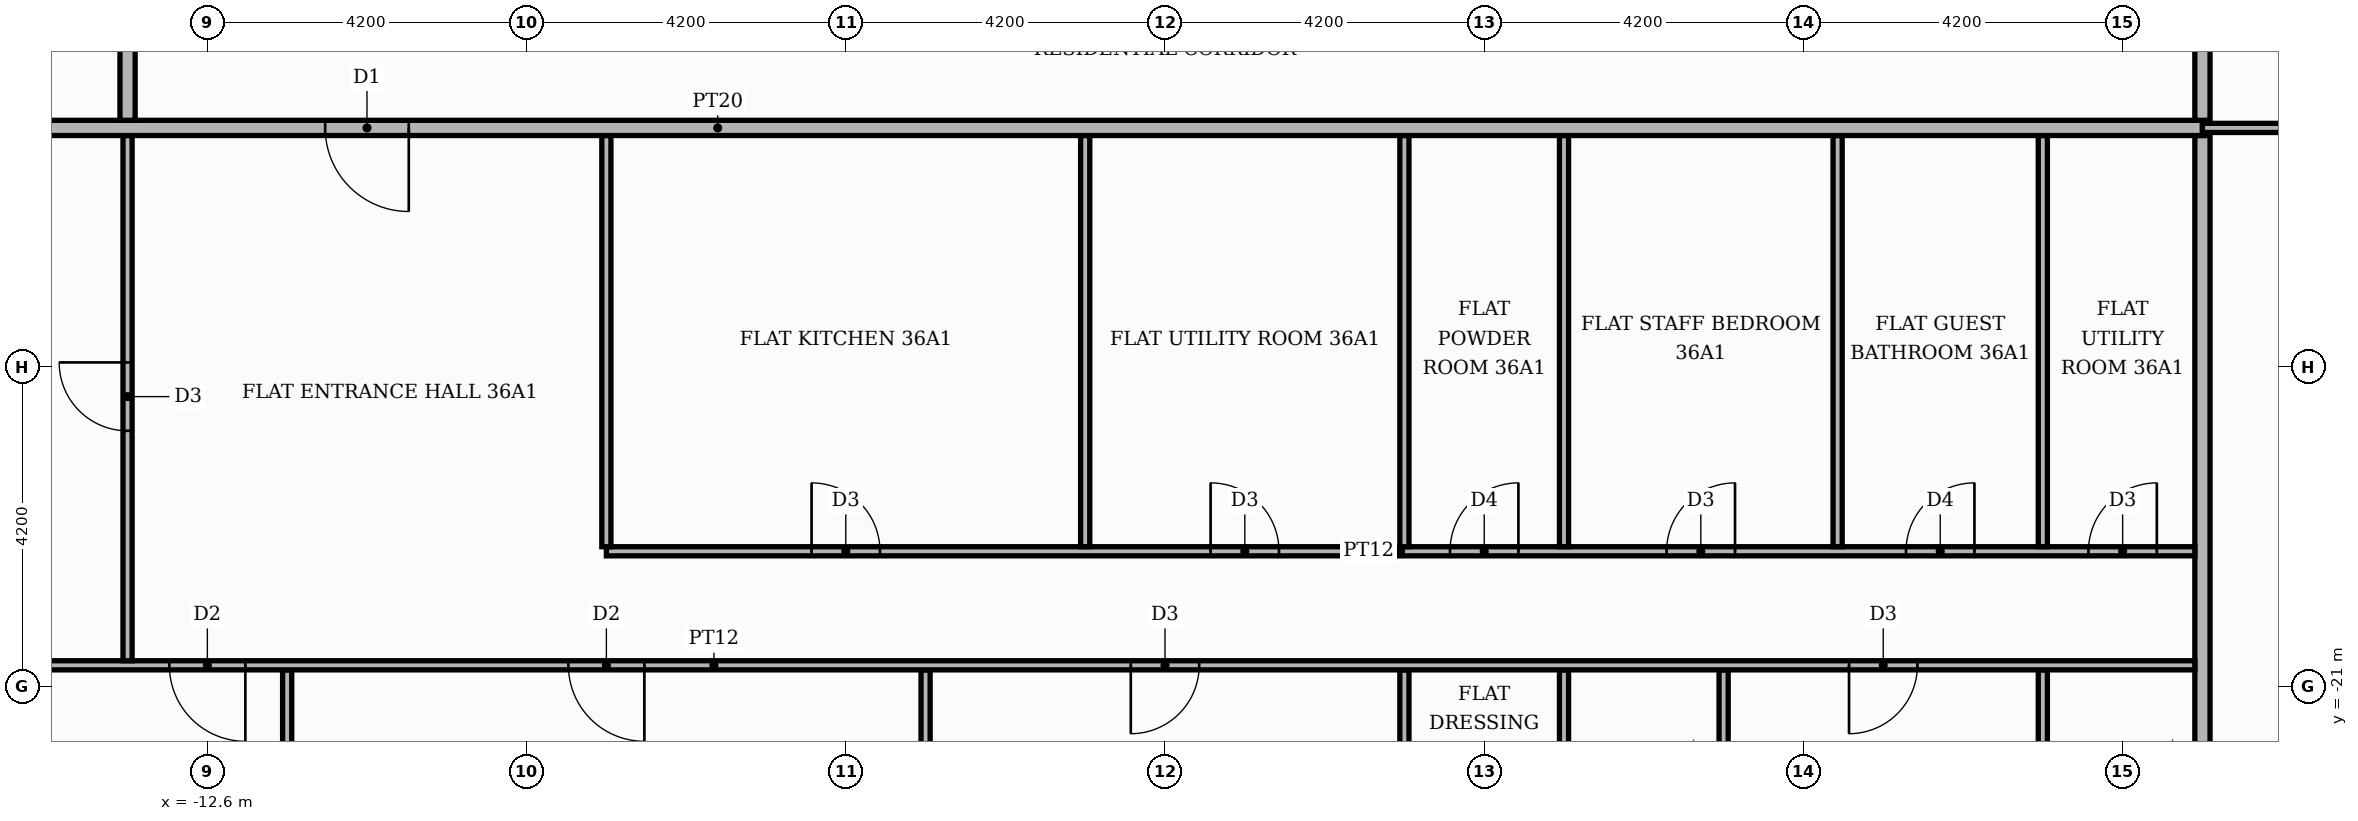
"""IFC4 building model, lengths in metres.
Left out: names, types, materials, properties, quantities, classifications, styles, units other than length and angle.
Written with IfcOpenShell. Run it as: python <this file> out.ifc"""

import sys

from ifc_helpers import new_model, si_unit, direction, frame, frame_2d, origin, place, context, subcontext, project, spatial, rectangle, extrude, element, fill, save


model = new_model("IFC4")
c1 = context("Model", 3, precision=1e-05, world=origin(), true_north=direction((0.0, 1.0)))
c2 = subcontext(c1, "Body", "Model", "MODEL_VIEW")
j1 = project(units=[si_unit("LENGTHUNIT", "METRE"), si_unit("PLANEANGLEUNIT", "RADIAN")], contexts=[c1])
p1 = place(None, origin())
s1 = spatial("IfcSite", under=j1, at=p1, CompositionType="ELEMENT")
p2 = place(p1, origin())
s2 = spatial("IfcBuilding", under=s1, at=p2, CompositionType="ELEMENT")
p3 = place(p2, frame((0.0, 0.0, 153.3)))
s3 = spatial("IfcBuildingStorey", under=s2, at=p3, CompositionType="ELEMENT", Elevation=153.3)
for number, where, z_axis, x_axis in (
    (1, (-11.55, -25.42, 0.0), (0.0, 0.0, 1.0), (0.0, 1.0, 0.0)),
    (2, (-3.15, -25.42, 0.0), (0.0, 0.0, 1.0), (0.0, 1.0, 0.0)),
):
    element("IfcWall", number, at=place(p3, frame(where, z_axis=z_axis, x_axis=x_axis)), inside=s3, PredefinedType="PARTITIONING", context=c2, shape_type="SweptSolid", body=[
        extrude(rectangle(XDim=4.64, YDim=0.12, at=frame_2d((2.32, 0.0))), origin(), (0.0, 0.0, 1.0), 3.48),
    ])
p4 = place(p3, frame((3.15, -25.42, 0.0), z_axis=(0.0, 0.0, 1.0), x_axis=(0.0, 1.0, 0.0)))
e3 = element("IfcWall", 3, at=p4, inside=s3, PredefinedType="PARTITIONING", context=c2, shape_type="SweptSolid", body=[
    extrude(rectangle(XDim=4.64, YDim=0.12, at=frame_2d((2.32, 0.0))), origin(), (0.0, 0.0, 1.0), 3.48),
])
p5 = place(p4, frame((1.75, 0.0, 0.0)))
e4 = element("IfcOpeningElement", 4, at=p5, cuts=e3, PredefinedType="OPENING", context=c2, shape_type="SweptSolid", body=[
    extrude(rectangle(XDim=0.9, YDim=2.1, at=frame_2d((0.45, 1.05))), frame((0.0, 0.07, 0.0), z_axis=(0.0, -1.0, 0.0), x_axis=(1.0, 0.0, 0.0)), (0.0, 0.0, 1.0), 0.14),
])
p6 = place(p3, frame((5.25, -25.42, 0.0), z_axis=(0.0, 0.0, 1.0), x_axis=(0.0, 1.0, 0.0)))
e5 = element("IfcWall", 5, at=p6, inside=s3, PredefinedType="PARTITIONING", context=c2, shape_type="SweptSolid", body=[
    extrude(rectangle(XDim=4.64, YDim=0.12, at=frame_2d((2.32, 0.0))), origin(), (0.0, 0.0, 1.0), 3.48),
])
p7 = place(p6, frame((1.75, 0.0, 0.0)))
e6 = element("IfcOpeningElement", 6, at=p7, cuts=e5, PredefinedType="OPENING", context=c2, shape_type="SweptSolid", body=[
    extrude(rectangle(XDim=0.9, YDim=2.1, at=frame_2d((0.45, 1.05))), frame((0.0, 0.07, 0.0), z_axis=(0.0, -1.0, 0.0), x_axis=(1.0, 0.0, 0.0)), (0.0, 0.0, 1.0), 0.14),
])
p8 = place(p3, frame((7.35, -25.42, 0.0), z_axis=(0.0, 0.0, 1.0), x_axis=(0.0, 1.0, 0.0)))
e7 = element("IfcWall", 7, at=p8, inside=s3, PredefinedType="PARTITIONING", context=c2, shape_type="SweptSolid", body=[
    extrude(rectangle(XDim=4.64, YDim=0.12, at=frame_2d((2.32, 0.0))), origin(), (0.0, 0.0, 1.0), 3.48),
])
p9 = place(p3, frame((11.55, -25.42, 0.0), z_axis=(0.0, 0.0, 1.0), x_axis=(0.0, 1.0, 0.0)))
e8 = element("IfcWall", 8, at=p9, inside=s3, PredefinedType="PARTITIONING", context=c2, shape_type="SweptSolid", body=[
    extrude(rectangle(XDim=4.64, YDim=0.12, at=frame_2d((2.32, 0.0))), origin(), (0.0, 0.0, 1.0), 3.48),
])
p10 = place(p9, frame((1.75, 0.0, 0.0)))
e9 = element("IfcOpeningElement", 9, at=p10, cuts=e8, PredefinedType="OPENING", context=c2, shape_type="SweptSolid", body=[
    extrude(rectangle(XDim=0.9, YDim=2.1, at=frame_2d((0.45, 1.05))), frame((0.0, 0.07, 0.0), z_axis=(0.0, -1.0, 0.0), x_axis=(1.0, 0.0, 0.0)), (0.0, 0.0, 1.0), 0.14),
])
p11 = place(p3, frame((13.65, -25.42, 0.0), z_axis=(0.0, 0.0, 1.0), x_axis=(0.0, 1.0, 0.0)))
e10 = element("IfcWall", 10, at=p11, inside=s3, PredefinedType="PARTITIONING", context=c2, shape_type="SweptSolid", body=[
    extrude(rectangle(XDim=11.67, YDim=0.2, at=frame_2d((5.835, 0.0))), origin(), (0.0, 0.0, 1.0), 3.48),
])
p12 = place(p3, frame((-25.42, -20.72, 0.0), z_axis=(0.0, 0.0, 1.0), x_axis=(1.0, 0.0, 0.0)))
e11 = element("IfcWall", 11, at=p12, inside=s3, PredefinedType="PARTITIONING", context=c2, shape_type="SweptSolid", body=[
    extrude(rectangle(XDim=38.97, YDim=0.12, at=frame_2d((19.485, 0.0))), origin(), (0.0, 0.0, 1.0), 3.48),
])
p13 = place(p12, frame((12.32, 0.0, 0.0)))
e12 = element("IfcOpeningElement", 12, at=p13, cuts=e11, PredefinedType="OPENING", context=c2, shape_type="SweptSolid", body=[
    extrude(rectangle(XDim=1.0, YDim=2.1, at=frame_2d((0.5, 1.05))), frame((0.0, 0.07, 0.0), z_axis=(0.0, -1.0, 0.0), x_axis=(1.0, 0.0, 0.0)), (0.0, 0.0, 1.0), 0.14),
])
p14 = place(p12, frame((17.57, 0.0, 0.0)))
e13 = element("IfcOpeningElement", 13, at=p14, cuts=e11, PredefinedType="OPENING", context=c2, shape_type="SweptSolid", body=[
    extrude(rectangle(XDim=1.0, YDim=2.1, at=frame_2d((0.5, 1.05))), frame((0.0, 0.07, 0.0), z_axis=(0.0, -1.0, 0.0), x_axis=(1.0, 0.0, 0.0)), (0.0, 0.0, 1.0), 0.14),
])
p15 = place(p12, frame((24.97, 0.0, 0.0)))
e14 = element("IfcOpeningElement", 14, at=p15, cuts=e11, PredefinedType="OPENING", context=c2, shape_type="SweptSolid", body=[
    extrude(rectangle(XDim=0.9, YDim=2.1, at=frame_2d((0.45, 1.05))), frame((0.0, 0.07, 0.0), z_axis=(0.0, -1.0, 0.0), x_axis=(1.0, 0.0, 0.0)), (0.0, 0.0, 1.0), 0.14),
])
p16 = place(p12, frame((34.42, 0.0, 0.0)))
e15 = element("IfcOpeningElement", 15, at=p16, cuts=e11, PredefinedType="OPENING", context=c2, shape_type="SweptSolid", body=[
    extrude(rectangle(XDim=0.9, YDim=2.1, at=frame_2d((0.45, 1.05))), frame((0.0, 0.07, 0.0), z_axis=(0.0, -1.0, 0.0), x_axis=(1.0, 0.0, 0.0)), (0.0, 0.0, 1.0), 0.14),
])
p17 = place(p3, frame((-13.65, -20.66, 0.0), z_axis=(0.0, 0.0, 1.0), x_axis=(0.0, 1.0, 0.0)))
e16 = element("IfcWall", 16, at=p17, inside=s3, PredefinedType="PARTITIONING", context=c2, shape_type="SweptSolid", body=[
    extrude(rectangle(XDim=6.91, YDim=0.12, at=frame_2d((3.455, 0.0))), origin(), (0.0, 0.0, 1.0), 3.48),
])
p18 = place(p17, frame((3.025, 0.0, 0.0)))
e17 = element("IfcOpeningElement", 17, at=p18, cuts=e16, PredefinedType="OPENING", context=c2, shape_type="SweptSolid", body=[
    extrude(rectangle(XDim=0.9, YDim=2.1, at=frame_2d((0.45, 1.05))), frame((0.0, 0.07, 0.0), z_axis=(0.0, -1.0, 0.0), x_axis=(1.0, 0.0, 0.0)), (0.0, 0.0, 1.0), 0.14),
])
p19 = place(p3, frame((-7.35, -19.22, 0.0), z_axis=(0.0, 0.0, 1.0), x_axis=(1.0, 0.0, 0.0)))
e18 = element("IfcWall", 18, at=p19, inside=s3, PredefinedType="PARTITIONING", context=c2, shape_type="SweptSolid", body=[
    extrude(rectangle(XDim=20.9, YDim=0.12, at=frame_2d((10.45, 0.0))), origin(), (0.0, 0.0, 1.0), 3.48),
])
p20 = place(p19, frame((2.7, 0.0, 0.0)))
e19 = element("IfcOpeningElement", 19, at=p20, cuts=e18, PredefinedType="OPENING", context=c2, shape_type="SweptSolid", body=[
    extrude(rectangle(XDim=0.9, YDim=2.1, at=frame_2d((0.45, 1.05))), frame((0.0, 0.07, 0.0), z_axis=(0.0, -1.0, 0.0), x_axis=(1.0, 0.0, 0.0)), (0.0, 0.0, 1.0), 0.14),
])
p21 = place(p19, frame((7.95, 0.0, 0.0)))
e20 = element("IfcOpeningElement", 20, at=p21, cuts=e18, PredefinedType="OPENING", context=c2, shape_type="SweptSolid", body=[
    extrude(rectangle(XDim=0.9, YDim=2.1, at=frame_2d((0.45, 1.05))), frame((0.0, 0.07, 0.0), z_axis=(0.0, -1.0, 0.0), x_axis=(1.0, 0.0, 0.0)), (0.0, 0.0, 1.0), 0.14),
])
p22 = place(p19, frame((11.1, 0.0, 0.0)))
e21 = element("IfcOpeningElement", 21, at=p22, cuts=e18, PredefinedType="OPENING", context=c2, shape_type="SweptSolid", body=[
    extrude(rectangle(XDim=0.9, YDim=2.1, at=frame_2d((0.45, 1.05))), frame((0.0, 0.07, 0.0), z_axis=(0.0, -1.0, 0.0), x_axis=(1.0, 0.0, 0.0)), (0.0, 0.0, 1.0), 0.14),
])
p23 = place(p19, frame((13.95, 0.0, 0.0)))
e22 = element("IfcOpeningElement", 22, at=p23, cuts=e18, PredefinedType="OPENING", context=c2, shape_type="SweptSolid", body=[
    extrude(rectangle(XDim=0.9, YDim=2.1, at=frame_2d((0.45, 1.05))), frame((0.0, 0.07, 0.0), z_axis=(0.0, -1.0, 0.0), x_axis=(1.0, 0.0, 0.0)), (0.0, 0.0, 1.0), 0.14),
])
p24 = place(p19, frame((17.1, 0.0, 0.0)))
e23 = element("IfcOpeningElement", 23, at=p24, cuts=e18, PredefinedType="OPENING", context=c2, shape_type="SweptSolid", body=[
    extrude(rectangle(XDim=0.9, YDim=2.1, at=frame_2d((0.45, 1.05))), frame((0.0, 0.07, 0.0), z_axis=(0.0, -1.0, 0.0), x_axis=(1.0, 0.0, 0.0)), (0.0, 0.0, 1.0), 0.14),
])
p25 = place(p19, frame((19.5, 0.0, 0.0)))
e24 = element("IfcOpeningElement", 24, at=p25, cuts=e18, PredefinedType="OPENING", context=c2, shape_type="SweptSolid", body=[
    extrude(rectangle(XDim=0.9, YDim=2.1, at=frame_2d((0.45, 1.05))), frame((0.0, 0.07, 0.0), z_axis=(0.0, -1.0, 0.0), x_axis=(1.0, 0.0, 0.0)), (0.0, 0.0, 1.0), 0.14),
])
for number, where, z_axis, x_axis in (
    (25, (-7.35, -19.16, 0.0), (0.0, 0.0, 1.0), (0.0, 1.0, 0.0)),
    (26, (-1.05, -19.16, 0.0), (0.0, 0.0, 1.0), (0.0, 1.0, 0.0)),
    (27, (3.15, -19.16, 0.0), (0.0, 0.0, 1.0), (0.0, 1.0, 0.0)),
    (28, (5.25, -19.16, 0.0), (0.0, 0.0, 1.0), (0.0, 1.0, 0.0)),
    (29, (8.85, -19.16, 0.0), (0.0, 0.0, 1.0), (0.0, 1.0, 0.0)),
    (30, (11.55, -19.16, 0.0), (0.0, 0.0, 1.0), (0.0, 1.0, 0.0)),
):
    element("IfcWall", number, at=place(p3, frame(where, z_axis=z_axis, x_axis=x_axis)), inside=s3, PredefinedType="PARTITIONING", context=c2, shape_type="SweptSolid", body=[
        extrude(rectangle(XDim=5.41, YDim=0.12, at=frame_2d((2.705, 0.0))), origin(), (0.0, 0.0, 1.0), 3.48),
    ])
p26 = place(p3, frame((-25.42, -13.65, 0.0), z_axis=(0.0, 0.0, 1.0), x_axis=(1.0, 0.0, 0.0)))
e31 = element("IfcWall", 31, at=p26, inside=s3, PredefinedType="PARTITIONING", context=c2, shape_type="SweptSolid", body=[
    extrude(rectangle(XDim=39.07, YDim=0.2, at=frame_2d((19.535, 0.0))), origin(), (0.0, 0.0, 1.0), 3.48),
])
p27 = place(p26, frame((14.37, 0.0, 0.0)))
e32 = element("IfcOpeningElement", 32, at=p27, cuts=e31, PredefinedType="OPENING", context=c2, shape_type="SweptSolid", body=[
    extrude(rectangle(XDim=1.1, YDim=2.4, at=frame_2d((0.55, 1.2))), frame((0.0, 0.11, 0.0), z_axis=(0.0, -1.0, 0.0), x_axis=(1.0, 0.0, 0.0)), (0.0, 0.0, 1.0), 0.22),
])
p28 = place(p3, frame((13.65, -13.65, 0.0), z_axis=(0.0, 0.0, 1.0), x_axis=(1.0, 0.0, 0.0)))
e33 = element("IfcWall", 33, at=p28, inside=s3, PredefinedType="PARTITIONING", context=c2, shape_type="SweptSolid", body=[
    extrude(rectangle(XDim=6.17, YDim=0.12, at=frame_2d((3.085, 0.0))), origin(), (0.0, 0.0, 1.0), 3.48),
])
p29 = place(p28, frame((2.635, 0.0, 0.0)))
e34 = element("IfcOpeningElement", 34, at=p29, cuts=e33, PredefinedType="OPENING", context=c2, shape_type="SweptSolid", body=[
    extrude(rectangle(XDim=0.9, YDim=2.1, at=frame_2d((0.45, 1.05))), frame((0.0, 0.07, 0.0), z_axis=(0.0, -1.0, 0.0), x_axis=(1.0, 0.0, 0.0)), (0.0, 0.0, 1.0), 0.14),
])
for number, where, z_axis, x_axis in (
    (35, (-13.65, -13.55, 0.0), (0.0, 0.0, 1.0), (0.0, 1.0, 0.0)),
    (36, (13.65, -13.55, 0.0), (0.0, 0.0, 1.0), (0.0, 1.0, 0.0)),
):
    element("IfcWall", number, at=place(p3, frame(where, z_axis=z_axis, x_axis=x_axis)), inside=s3, PredefinedType="PARTITIONING", context=c2, shape_type="SweptSolid", body=[
        extrude(rectangle(XDim=2.45, YDim=0.2, at=frame_2d((1.225, 0.0))), origin(), (0.0, 0.0, 1.0), 3.48),
    ])
p30 = place(p27, frame((1.1, 0.0, 0.0), z_axis=(0.0, 0.0, 1.0), x_axis=(-1.0, 0.0, 0.0)))
e37 = element("IfcDoor", 37, at=p30, inside=s3, OperationType="SINGLE_SWING_RIGHT", PredefinedType="DOOR", context=c2, shape_type="SweptSolid", body=[
    extrude(rectangle(XDim=1.1, YDim=2.4, at=frame_2d((0.55, 1.2))), frame((0.0, 0.025, 0.0), z_axis=(0.0, -1.0, 0.0), x_axis=(1.0, 0.0, 0.0)), (0.0, 0.0, 1.0), 0.05),
])
fill(e32, e37)
p31 = place(p18, origin())
e38 = element("IfcDoor", 38, at=p31, inside=s3, OperationType="SINGLE_SWING_RIGHT", PredefinedType="DOOR", context=c2, shape_type="SweptSolid", body=[
    extrude(rectangle(XDim=0.9, YDim=2.1, at=frame_2d((0.45, 1.05))), frame((0.0, 0.025, 0.0), z_axis=(0.0, -1.0, 0.0), x_axis=(1.0, 0.0, 0.0)), (0.0, 0.0, 1.0), 0.05),
])
fill(e17, e38)
p32 = place(p20, origin())
e39 = element("IfcDoor", 39, at=p32, inside=s3, OperationType="SINGLE_SWING_LEFT", PredefinedType="DOOR", context=c2, shape_type="SweptSolid", body=[
    extrude(rectangle(XDim=0.9, YDim=2.1, at=frame_2d((0.45, 1.05))), frame((0.0, 0.025, 0.0), z_axis=(0.0, -1.0, 0.0), x_axis=(1.0, 0.0, 0.0)), (0.0, 0.0, 1.0), 0.05),
])
fill(e19, e39)
p33 = place(p21, origin())
e40 = element("IfcDoor", 40, at=p33, inside=s3, OperationType="SINGLE_SWING_LEFT", PredefinedType="DOOR", context=c2, shape_type="SweptSolid", body=[
    extrude(rectangle(XDim=0.9, YDim=2.1, at=frame_2d((0.45, 1.05))), frame((0.0, 0.025, 0.0), z_axis=(0.0, -1.0, 0.0), x_axis=(1.0, 0.0, 0.0)), (0.0, 0.0, 1.0), 0.05),
])
fill(e20, e40)
p34 = place(p22, origin())
e41 = element("IfcDoor", 41, at=p34, inside=s3, OperationType="SINGLE_SWING_RIGHT", PredefinedType="DOOR", context=c2, shape_type="SweptSolid", body=[
    extrude(rectangle(XDim=0.9, YDim=2.1, at=frame_2d((0.45, 1.05))), frame((0.0, 0.025, 0.0), z_axis=(0.0, -1.0, 0.0), x_axis=(1.0, 0.0, 0.0)), (0.0, 0.0, 1.0), 0.05),
])
fill(e21, e41)
p35 = place(p23, origin())
e42 = element("IfcDoor", 42, at=p35, inside=s3, OperationType="SINGLE_SWING_RIGHT", PredefinedType="DOOR", context=c2, shape_type="SweptSolid", body=[
    extrude(rectangle(XDim=0.9, YDim=2.1, at=frame_2d((0.45, 1.05))), frame((0.0, 0.025, 0.0), z_axis=(0.0, -1.0, 0.0), x_axis=(1.0, 0.0, 0.0)), (0.0, 0.0, 1.0), 0.05),
])
fill(e22, e42)
p36 = place(p24, origin())
e43 = element("IfcDoor", 43, at=p36, inside=s3, OperationType="SINGLE_SWING_RIGHT", PredefinedType="DOOR", context=c2, shape_type="SweptSolid", body=[
    extrude(rectangle(XDim=0.9, YDim=2.1, at=frame_2d((0.45, 1.05))), frame((0.0, 0.025, 0.0), z_axis=(0.0, -1.0, 0.0), x_axis=(1.0, 0.0, 0.0)), (0.0, 0.0, 1.0), 0.05),
])
fill(e23, e43)
p37 = place(p25, origin())
e44 = element("IfcDoor", 44, at=p37, inside=s3, OperationType="SINGLE_SWING_RIGHT", PredefinedType="DOOR", context=c2, shape_type="SweptSolid", body=[
    extrude(rectangle(XDim=0.9, YDim=2.1, at=frame_2d((0.45, 1.05))), frame((0.0, 0.025, 0.0), z_axis=(0.0, -1.0, 0.0), x_axis=(1.0, 0.0, 0.0)), (0.0, 0.0, 1.0), 0.05),
])
fill(e24, e44)
p38 = place(p13, frame((1.0, 0.0, 0.0), z_axis=(0.0, 0.0, 1.0), x_axis=(-1.0, 0.0, 0.0)))
e45 = element("IfcDoor", 45, at=p38, inside=s3, OperationType="SINGLE_SWING_RIGHT", PredefinedType="DOOR", context=c2, shape_type="SweptSolid", body=[
    extrude(rectangle(XDim=1.0, YDim=2.1, at=frame_2d((0.5, 1.05))), frame((0.0, 0.025, 0.0), z_axis=(0.0, -1.0, 0.0), x_axis=(1.0, 0.0, 0.0)), (0.0, 0.0, 1.0), 0.05),
])
fill(e12, e45)
p39 = place(p14, frame((1.0, 0.0, 0.0), z_axis=(0.0, 0.0, 1.0), x_axis=(-1.0, 0.0, 0.0)))
e46 = element("IfcDoor", 46, at=p39, inside=s3, OperationType="SINGLE_SWING_RIGHT", PredefinedType="DOOR", context=c2, shape_type="SweptSolid", body=[
    extrude(rectangle(XDim=1.0, YDim=2.1, at=frame_2d((0.5, 1.05))), frame((0.0, 0.025, 0.0), z_axis=(0.0, -1.0, 0.0), x_axis=(1.0, 0.0, 0.0)), (0.0, 0.0, 1.0), 0.05),
])
fill(e13, e46)
p40 = place(p15, frame((0.9, 0.0, 0.0), z_axis=(0.0, 0.0, 1.0), x_axis=(-1.0, 0.0, 0.0)))
e47 = element("IfcDoor", 47, at=p40, inside=s3, OperationType="SINGLE_SWING_LEFT", PredefinedType="DOOR", context=c2, shape_type="SweptSolid", body=[
    extrude(rectangle(XDim=0.9, YDim=2.1, at=frame_2d((0.45, 1.05))), frame((0.0, 0.025, 0.0), z_axis=(0.0, -1.0, 0.0), x_axis=(1.0, 0.0, 0.0)), (0.0, 0.0, 1.0), 0.05),
])
fill(e14, e47)
p41 = place(p16, frame((0.9, 0.0, 0.0), z_axis=(0.0, 0.0, 1.0), x_axis=(-1.0, 0.0, 0.0)))
e48 = element("IfcDoor", 48, at=p41, inside=s3, OperationType="SINGLE_SWING_LEFT", PredefinedType="DOOR", context=c2, shape_type="SweptSolid", body=[
    extrude(rectangle(XDim=0.9, YDim=2.1, at=frame_2d((0.45, 1.05))), frame((0.0, 0.025, 0.0), z_axis=(0.0, -1.0, 0.0), x_axis=(1.0, 0.0, 0.0)), (0.0, 0.0, 1.0), 0.05),
])
fill(e15, e48)
save(model, sys.argv[1])
